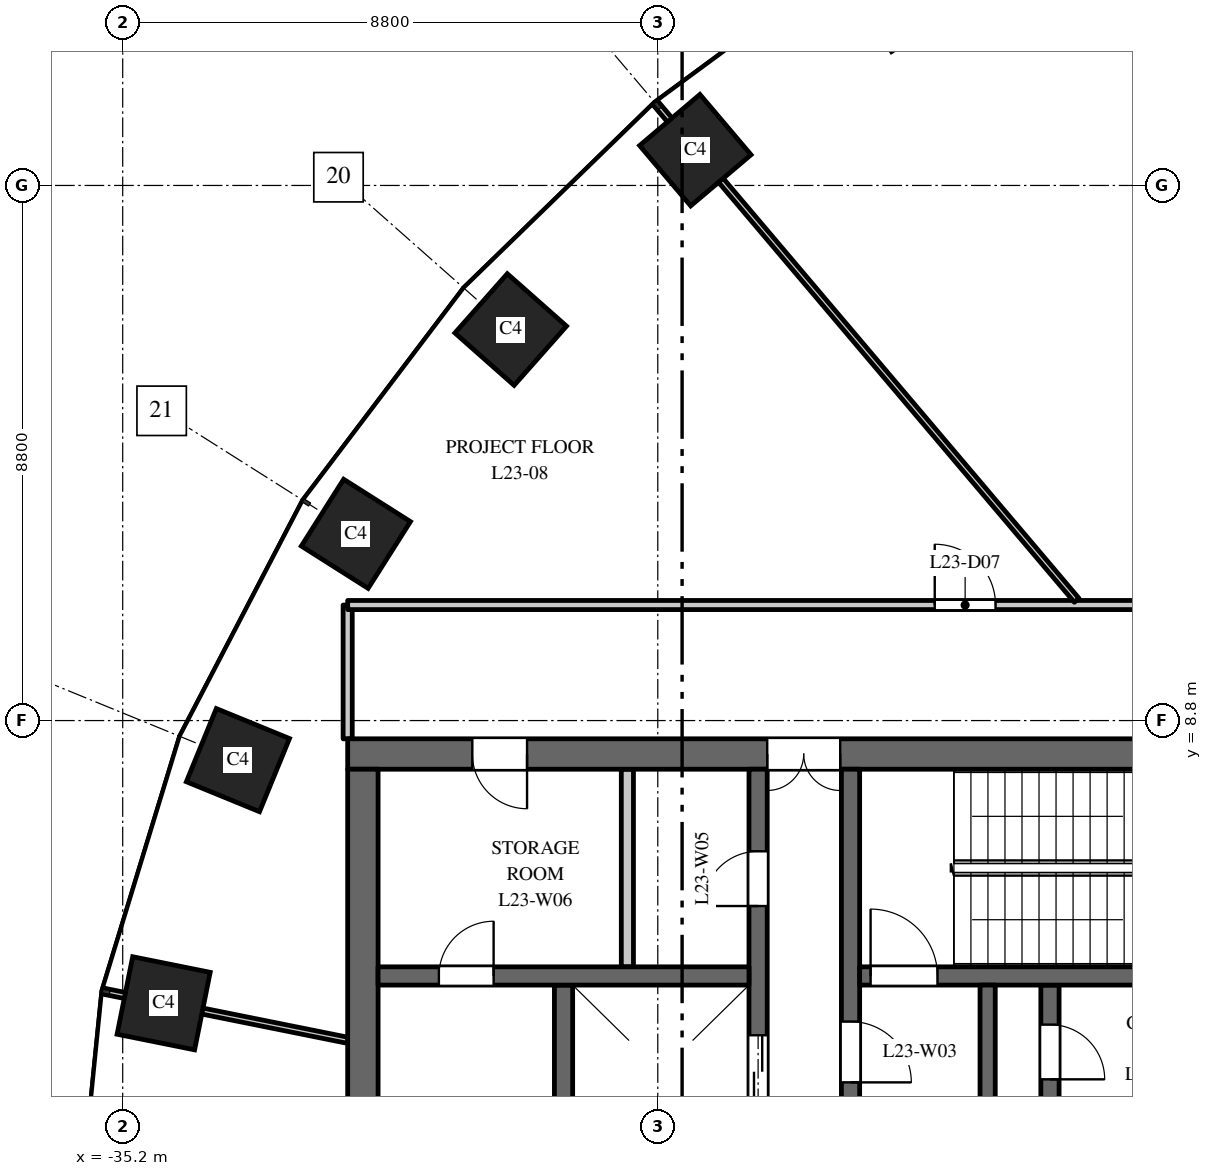
"""IFC4 building model, lengths in metres.
Left out: names, types, materials, properties, quantities, classifications, styles, units other than length and angle.
Written with IfcOpenShell. Run it as: python <this file> out.ifc"""

import sys

from ifc_helpers import new_model, si_unit, direction, frame, frame_2d, origin, origin_2d, place, context, subcontext, project, spatial, rectangle, extrude, element, fill, save


model = new_model("IFC4")
c1 = context("Model", 3, precision=1e-05, world=origin(), true_north=direction((0.0, 1.0)))
c2 = subcontext(c1, "Body", "Model", "MODEL_VIEW")
j1 = project(units=[si_unit("LENGTHUNIT", "METRE"), si_unit("PLANEANGLEUNIT", "RADIAN")], contexts=[c1])
p1 = place(None, origin())
s1 = spatial("IfcSite", under=j1, at=p1, CompositionType="ELEMENT")
p2 = place(p1, origin())
s2 = spatial("IfcBuilding", under=s1, at=p2, CompositionType="ELEMENT")
p3 = place(p2, frame((0.0, 0.0, 104.0)))
s3 = spatial("IfcBuildingStorey", under=s2, at=p3, CompositionType="ELEMENT", Elevation=104.0)
for number, where, z_axis, x_axis in (
    (1, (-25.783, 18.18, 0.0), (0.0, 0.0, 1.0), (-0.763, -0.646, 0.0)),
    (2, (-28.819, 15.23, 0.0), (0.0, 0.0, 1.0), (-0.663, -0.749, 0.0)),
    (3, (-31.365, 11.871, 0.0), (0.0, 0.0, 1.0), (-0.535, -0.845, 0.0)),
    (4, (-33.305, 8.149, 0.0), (0.0, 0.0, 1.0), (-0.379, -0.925, 0.0)),
    (5, (-34.527, 4.151, 0.0), (0.0, 0.0, 1.0), (-0.197, -0.98, 0.0)),
):
    element("IfcColumn", number, at=place(p3, frame(where, z_axis=z_axis, x_axis=x_axis)), inside=s3, PredefinedType="COLUMN", context=c2, shape_type="SweptSolid", body=[
        extrude(rectangle(XDim=1.3, YDim=1.3, at=origin_2d()), origin(), (0.0, 0.0, 1.0), 4.0),
    ])
p4 = place(p3, frame((-16.5, 8.25, 0.0), z_axis=(0.0, 0.0, 1.0), x_axis=(-1.0, 0.0, 0.0)))
e6 = element("IfcWall", 6, at=p4, inside=s3, PredefinedType="SHEAR", context=c2, shape_type="SweptSolid", body=[
    extrude(rectangle(XDim=15.0, YDim=0.5, at=frame_2d((7.5, 0.0))), origin(), (0.0, 0.0, 1.0), 3.7),
])
p5 = place(p4, frame((6.9, 0.0, 0.0)))
e7 = element("IfcOpeningElement", 7, at=p5, cuts=e6, PredefinedType="OPENING", context=c2, shape_type="SweptSolid", body=[
    extrude(rectangle(XDim=1.2, YDim=2.1, at=frame_2d((0.6, 1.05))), frame((0.0, 0.26, 0.0), z_axis=(0.0, -1.0, 0.0), x_axis=(1.0, 0.0, 0.0)), (0.0, 0.0, 1.0), 0.52),
])
p6 = place(p4, frame((12.05, 0.0, 0.0)))
e8 = element("IfcOpeningElement", 8, at=p6, cuts=e6, PredefinedType="OPENING", context=c2, shape_type="SweptSolid", body=[
    extrude(rectangle(XDim=0.9, YDim=2.1, at=frame_2d((0.45, 1.05))), frame((0.0, 0.26, 0.0), z_axis=(0.0, -1.0, 0.0), x_axis=(1.0, 0.0, 0.0)), (0.0, 0.0, 1.0), 0.52),
])
p7 = place(p3, frame((-27.95, -4.45, 0.0), z_axis=(0.0, 0.0, 1.0), x_axis=(0.0, 1.0, 0.0)))
e9 = element("IfcWall", 9, at=p7, inside=s3, PredefinedType="SHEAR", context=c2, shape_type="SweptSolid", body=[
    extrude(rectangle(XDim=8.9, YDim=0.3, at=frame_2d((4.45, 0.0))), origin(), (0.0, 0.0, 1.0), 3.7),
])
p8 = place(p3, frame((-19.95, -4.45, 0.0), z_axis=(0.0, 0.0, 1.0), x_axis=(0.0, 1.0, 0.0)))
e10 = element("IfcWall", 10, at=p8, inside=s3, PredefinedType="SHEAR", context=c2, shape_type="SweptSolid", body=[
    extrude(rectangle(XDim=8.9, YDim=0.3, at=frame_2d((4.45, 0.0))), origin(), (0.0, 0.0, 1.0), 3.7),
])
p9 = place(p8, frame((0.775, 0.0, 0.0)))
e11 = element("IfcOpeningElement", 11, at=p9, cuts=e10, PredefinedType="OPENING", context=c2, shape_type="SweptSolid", body=[
    extrude(rectangle(XDim=1.2, YDim=2.1, at=frame_2d((0.6, 1.05))), frame((0.0, 0.16, 0.0), z_axis=(0.0, -1.0, 0.0), x_axis=(1.0, 0.0, 0.0)), (0.0, 0.0, 1.0), 0.32),
])
p10 = place(p8, frame((7.35, 0.0, 0.0)))
e12 = element("IfcOpeningElement", 12, at=p10, cuts=e10, PredefinedType="OPENING", context=c2, shape_type="SweptSolid", body=[
    extrude(rectangle(XDim=0.9, YDim=2.1, at=frame_2d((0.45, 1.05))), frame((0.0, 0.16, 0.0), z_axis=(0.0, -1.0, 0.0), x_axis=(1.0, 0.0, 0.0)), (0.0, 0.0, 1.0), 0.32),
])
p11 = place(p3, frame((-24.75, -8.0, 0.0), z_axis=(0.0, 0.0, 1.0), x_axis=(0.0, 1.0, 0.0)))
e13 = element("IfcWall", 13, at=p11, inside=s3, PredefinedType="SHEAR", context=c2, shape_type="SweptSolid", body=[
    extrude(rectangle(XDim=16.0, YDim=0.3, at=frame_2d((8.0, 0.0))), origin(), (0.0, 0.0, 1.0), 3.7),
])
p12 = place(p11, frame((4.425, 0.0, 0.0)))
e14 = element("IfcOpeningElement", 14, at=p12, cuts=e13, PredefinedType="OPENING", context=c2, shape_type="SweptSolid", body=[
    extrude(rectangle(XDim=1.1, YDim=2.1, at=frame_2d((0.55, 1.05))), frame((0.0, 0.16, 0.0), z_axis=(0.0, -1.0, 0.0), x_axis=(1.0, 0.0, 0.0)), (0.0, 0.0, 1.0), 0.32),
])
p13 = place(p11, frame((7.45, 0.0, 0.0)))
e15 = element("IfcOpeningElement", 15, at=p13, cuts=e13, PredefinedType="OPENING", context=c2, shape_type="SweptSolid", body=[
    extrude(rectangle(XDim=1.1, YDim=2.1, at=frame_2d((0.55, 1.05))), frame((0.0, 0.16, 0.0), z_axis=(0.0, -1.0, 0.0), x_axis=(1.0, 0.0, 0.0)), (0.0, 0.0, 1.0), 0.32),
])
p14 = place(p11, frame((10.425, 0.0, 0.0)))
e16 = element("IfcOpeningElement", 16, at=p14, cuts=e13, PredefinedType="OPENING", context=c2, shape_type="SweptSolid", body=[
    extrude(rectangle(XDim=1.2, YDim=2.1, at=frame_2d((0.6, 1.05))), frame((0.0, 0.16, 0.0), z_axis=(0.0, -1.0, 0.0), x_axis=(1.0, 0.0, 0.0)), (0.0, 0.0, 1.0), 0.32),
])
p15 = place(p11, frame((13.75, 0.0, 0.0)))
e17 = element("IfcOpeningElement", 17, at=p15, cuts=e13, PredefinedType="OPENING", context=c2, shape_type="SweptSolid", body=[
    extrude(rectangle(XDim=0.9, YDim=2.1, at=frame_2d((0.45, 1.05))), frame((0.0, 0.16, 0.0), z_axis=(0.0, -1.0, 0.0), x_axis=(1.0, 0.0, 0.0)), (0.0, 0.0, 1.0), 0.32),
])
p16 = place(p11, frame((1.35, 0.0, 0.0)))
e18 = element("IfcOpeningElement", 18, at=p16, cuts=e13, PredefinedType="OPENING", context=c2, shape_type="SweptSolid", body=[
    extrude(rectangle(XDim=0.9, YDim=2.1, at=frame_2d((0.45, 1.05))), frame((0.0, 0.16, 0.0), z_axis=(0.0, -1.0, 0.0), x_axis=(1.0, 0.0, 0.0)), (0.0, 0.0, 1.0), 0.32),
])
p17 = place(p3, frame((-31.25, -8.0, 0.0), z_axis=(0.0, 0.0, 1.0), x_axis=(0.0, 1.0, 0.0)))
e19 = element("IfcWall", 19, at=p17, inside=s3, PredefinedType="SHEAR", context=c2, shape_type="SweptSolid", body=[
    extrude(rectangle(XDim=16.0, YDim=0.5, at=frame_2d((8.0, 0.0))), origin(), (0.0, 0.0, 1.0), 3.7),
])
p18 = place(p3, frame((-24.9, 4.6, 0.0), z_axis=(0.0, 0.0, 1.0), x_axis=(-1.0, 0.0, 0.0)))
e20 = element("IfcWall", 20, at=p18, inside=s3, PredefinedType="SHEAR", context=c2, shape_type="SweptSolid", body=[
    extrude(rectangle(XDim=6.1, YDim=0.3, at=frame_2d((3.05, 0.0))), origin(), (0.0, 0.0, 1.0), 3.7),
])
p19 = place(p18, frame((4.2, 0.0, 0.0)))
e21 = element("IfcOpeningElement", 21, at=p19, cuts=e20, PredefinedType="OPENING", context=c2, shape_type="SweptSolid", body=[
    extrude(rectangle(XDim=0.9, YDim=2.1, at=frame_2d((0.45, 1.05))), frame((0.0, 0.16, 0.0), z_axis=(0.0, -1.0, 0.0), x_axis=(1.0, 0.0, 0.0)), (0.0, 0.0, 1.0), 0.32),
])
p20 = place(p3, frame((-26.9, 4.75, 0.0), z_axis=(0.0, 0.0, 1.0), x_axis=(0.0, 1.0, 0.0)))
e22 = element("IfcWall", 22, at=p20, inside=s3, PredefinedType="PARTITIONING", context=c2, shape_type="SweptSolid", body=[
    extrude(rectangle(XDim=3.25, YDim=0.2, at=frame_2d((1.625, 0.0))), origin(), (0.0, 0.0, 1.0), 3.7),
])
p21 = place(p3, frame((-23.23, 2.25, 0.0), z_axis=(0.0, 0.0, 1.0), x_axis=(0.0, 1.0, 0.0)))
e23 = element("IfcWall", 23, at=p21, inside=s3, PredefinedType="SHEAR", context=c2, shape_type="SweptSolid", body=[
    extrude(rectangle(XDim=5.75, YDim=0.3, at=frame_2d((2.875, 0.0))), origin(), (0.0, 0.0, 1.0), 3.7),
])
p22 = place(p21, frame((0.6, 0.0, 0.0)))
e24 = element("IfcOpeningElement", 24, at=p22, cuts=e23, PredefinedType="OPENING", context=c2, shape_type="SweptSolid", body=[
    extrude(rectangle(XDim=1.0, YDim=2.1, at=frame_2d((0.5, 1.05))), frame((0.0, 0.16, 0.0), z_axis=(0.0, -1.0, 0.0), x_axis=(1.0, 0.0, 0.0)), (0.0, 0.0, 1.0), 0.32),
])
p23 = place(p3, frame((-16.9, 4.6, 0.0), z_axis=(0.0, 0.0, 1.0), x_axis=(-1.0, 0.0, 0.0)))
e25 = element("IfcWall", 25, at=p23, inside=s3, PredefinedType="SHEAR", context=c2, shape_type="SweptSolid", body=[
    extrude(rectangle(XDim=6.18, YDim=0.3, at=frame_2d((3.09, 0.0))), origin(), (0.0, 0.0, 1.0), 3.7),
])
p24 = place(p23, frame((4.9, 0.0, 0.0)))
e26 = element("IfcOpeningElement", 26, at=p24, cuts=e25, PredefinedType="OPENING", context=c2, shape_type="SweptSolid", body=[
    extrude(rectangle(XDim=1.1, YDim=2.1, at=frame_2d((0.55, 1.05))), frame((0.0, 0.16, 0.0), z_axis=(0.0, -1.0, 0.0), x_axis=(1.0, 0.0, 0.0)), (0.0, 0.0, 1.0), 0.32),
])
p25 = place(p3, frame((-20.975, 2.25, 0.0), z_axis=(0.0, 0.0, 1.0), x_axis=(0.0, 1.0, 0.0)))
e27 = element("IfcWall", 27, at=p25, inside=s3, PredefinedType="SHEAR", context=c2, shape_type="SweptSolid", body=[
    extrude(rectangle(XDim=2.2, YDim=0.25, at=frame_2d((1.1, 0.0))), origin(), (0.0, 0.0, 1.0), 3.7),
])
p26 = place(p3, frame((-35.512, 4.349, 0.0), z_axis=(0.0, 0.0, 1.0), x_axis=(0.980357474535, -0.197228857227, 0.0)))
e28 = element("IfcWall", 28, at=p26, inside=s3, PredefinedType="PARTITIONING", context=c2, shape_type="SweptSolid", body=[
    extrude(rectangle(XDim=4.092, YDim=0.1, at=frame_2d((2.046, 0.0))), origin(), (0.0, 0.0, 1.0), 3.2),
])
p27 = place(p3, frame((-31.5, 8.5, 0.0), z_axis=(0.0, 0.0, 1.0), x_axis=(0.0, 1.0, 0.0)))
e29 = element("IfcWall", 29, at=p27, inside=s3, PredefinedType="PARTITIONING", context=c2, shape_type="SweptSolid", body=[
    extrude(rectangle(XDim=2.2, YDim=0.15, at=frame_2d((1.1, 0.0))), origin(), (0.0, 0.0, 1.0), 3.7),
])
p28 = place(p3, frame((-31.5, 10.7, 0.0), z_axis=(0.0, 0.0, 1.0), x_axis=(1.0, 0.0, 0.0)))
e30 = element("IfcWall", 30, at=p28, inside=s3, PredefinedType="PARTITIONING", context=c2, shape_type="SweptSolid", body=[
    extrude(rectangle(XDim=15.0, YDim=0.15, at=frame_2d((7.5, 0.0))), origin(), (0.0, 0.0, 1.0), 3.1),
])
p29 = place(p28, frame((9.655, 0.0, 0.0)))
e31 = element("IfcOpeningElement", 31, at=p29, cuts=e30, PredefinedType="OPENING", context=c2, shape_type="SweptSolid", body=[
    extrude(rectangle(XDim=1.0, YDim=2.1, at=frame_2d((0.5, 1.05))), frame((0.0, 0.085, 0.0), z_axis=(0.0, -1.0, 0.0), x_axis=(1.0, 0.0, 0.0)), (0.0, 0.0, 1.0), 0.17),
])
p30 = place(p3, frame((-26.43, 18.945, 0.0), z_axis=(0.0, 0.0, 1.0), x_axis=(0.646400187952, -0.762998556365, 0.0)))
e32 = element("IfcWall", 32, at=p30, inside=s3, PredefinedType="PARTITIONING", context=c2, shape_type="SweptSolid", body=[
    extrude(rectangle(XDim=10.704, YDim=0.1, at=frame_2d((5.352, 0.0))), origin(), (0.0, 0.0, 1.0), 3.7),
])
p31 = place(p14, origin())
e33 = element("IfcDoor", 33, at=p31, inside=s3, OperationType="DOUBLE_DOOR_SLIDING", PredefinedType="DOOR", context=c2, shape_type="SweptSolid", body=[
    extrude(rectangle(XDim=1.2, YDim=2.1, at=frame_2d((0.6, 1.05))), frame((0.0, 0.025, 0.0), z_axis=(0.0, -1.0, 0.0), x_axis=(1.0, 0.0, 0.0)), (0.0, 0.0, 1.0), 0.05),
])
fill(e16, e33)
p32 = place(p24, origin())
e34 = element("IfcDoor", 34, at=p32, inside=s3, OperationType="SINGLE_SWING_RIGHT", PredefinedType="DOOR", context=c2, shape_type="SweptSolid", body=[
    extrude(rectangle(XDim=1.1, YDim=2.1, at=frame_2d((0.55, 1.05))), frame((0.0, 0.025, 0.0), z_axis=(0.0, -1.0, 0.0), x_axis=(1.0, 0.0, 0.0)), (0.0, 0.0, 1.0), 0.05),
])
fill(e26, e34)
p33 = place(p22, origin())
e35 = element("IfcDoor", 35, at=p33, inside=s3, OperationType="SINGLE_SWING_LEFT", PredefinedType="DOOR", context=c2, shape_type="SweptSolid", body=[
    extrude(rectangle(XDim=1.0, YDim=2.1, at=frame_2d((0.5, 1.05))), frame((0.0, 0.025, 0.0), z_axis=(0.0, -1.0, 0.0), x_axis=(1.0, 0.0, 0.0)), (0.0, 0.0, 1.0), 0.05),
])
fill(e24, e35)
p34 = place(p5, origin())
e36 = element("IfcDoor", 36, at=p34, inside=s3, OperationType="DOUBLE_DOOR_DOUBLE_SWING", PredefinedType="DOOR", context=c2, shape_type="SweptSolid", body=[
    extrude(rectangle(XDim=1.2, YDim=2.1, at=frame_2d((0.6, 1.05))), frame((0.0, 0.025, 0.0), z_axis=(0.0, -1.0, 0.0), x_axis=(1.0, 0.0, 0.0)), (0.0, 0.0, 1.0), 0.05),
])
fill(e7, e36)
p35 = place(p10, origin())
e37 = element("IfcDoor", 37, at=p35, inside=s3, OperationType="SINGLE_SWING_LEFT", PredefinedType="DOOR", context=c2, shape_type="SweptSolid", body=[
    extrude(rectangle(XDim=0.9, YDim=2.1, at=frame_2d((0.45, 1.05))), frame((0.0, 0.025, 0.0), z_axis=(0.0, -1.0, 0.0), x_axis=(1.0, 0.0, 0.0)), (0.0, 0.0, 1.0), 0.05),
])
fill(e12, e37)
p36 = place(p15, origin())
e38 = element("IfcDoor", 38, at=p36, inside=s3, OperationType="SINGLE_SWING_RIGHT", PredefinedType="DOOR", context=c2, shape_type="SweptSolid", body=[
    extrude(rectangle(XDim=0.9, YDim=2.1, at=frame_2d((0.45, 1.05))), frame((0.0, 0.025, 0.0), z_axis=(0.0, -1.0, 0.0), x_axis=(1.0, 0.0, 0.0)), (0.0, 0.0, 1.0), 0.05),
])
fill(e17, e38)
p37 = place(p6, origin())
e39 = element("IfcDoor", 39, at=p37, inside=s3, OperationType="SINGLE_SWING_RIGHT", PredefinedType="DOOR", context=c2, shape_type="SweptSolid", body=[
    extrude(rectangle(XDim=0.9, YDim=2.1, at=frame_2d((0.45, 1.05))), frame((0.0, 0.025, 0.0), z_axis=(0.0, -1.0, 0.0), x_axis=(1.0, 0.0, 0.0)), (0.0, 0.0, 1.0), 0.05),
])
fill(e8, e39)
p38 = place(p19, origin())
e40 = element("IfcDoor", 40, at=p38, inside=s3, OperationType="SINGLE_SWING_LEFT", PredefinedType="DOOR", context=c2, shape_type="SweptSolid", body=[
    extrude(rectangle(XDim=0.9, YDim=2.1, at=frame_2d((0.45, 1.05))), frame((0.0, 0.025, 0.0), z_axis=(0.0, -1.0, 0.0), x_axis=(1.0, 0.0, 0.0)), (0.0, 0.0, 1.0), 0.05),
])
fill(e21, e40)
p39 = place(p29, origin())
e41 = element("IfcDoor", 41, at=p39, inside=s3, OperationType="SINGLE_SWING_LEFT", PredefinedType="DOOR", context=c2, shape_type="SweptSolid", body=[
    extrude(rectangle(XDim=1.0, YDim=2.1, at=frame_2d((0.5, 1.05))), frame((0.0, 0.025, 0.0), z_axis=(0.0, -1.0, 0.0), x_axis=(1.0, 0.0, 0.0)), (0.0, 0.0, 1.0), 0.05),
])
fill(e31, e41)
save(model, sys.argv[1])
